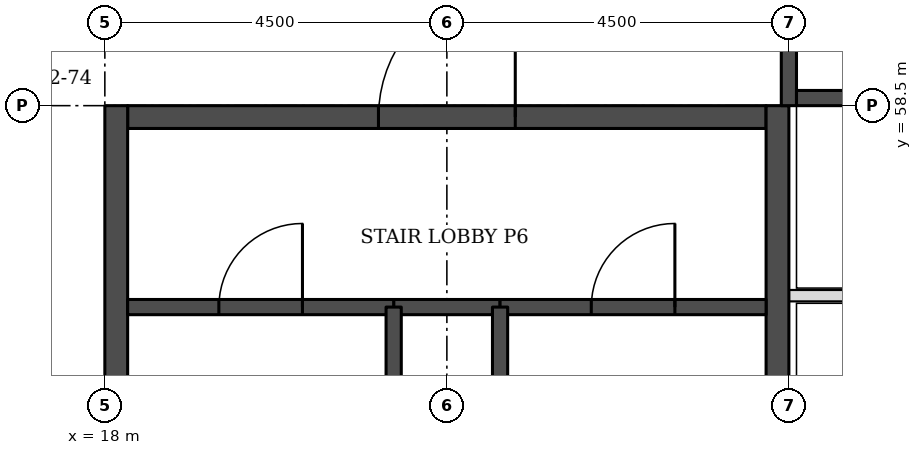
"""IFC4 building model, lengths in metres.
Left out: names, types, materials, properties, quantities, classifications, styles, units other than length and angle.
Written with IfcOpenShell. Run it as: python <this file> out.ifc"""

import sys

from ifc_helpers import new_model, si_unit, direction, frame, frame_2d, origin, place, context, subcontext, project, spatial, rectangle, extrude, element, fill, save


model = new_model("IFC4")
c1 = context("Model", 3, precision=1e-05, world=origin(), true_north=direction((0.0, 1.0)))
c2 = subcontext(c1, "Body", "Model", "MODEL_VIEW")
j1 = project(units=[si_unit("LENGTHUNIT", "METRE"), si_unit("PLANEANGLEUNIT", "RADIAN")], contexts=[c1])
p1 = place(None, origin())
s1 = spatial("IfcSite", under=j1, at=p1, CompositionType="ELEMENT")
p2 = place(p1, origin())
s2 = spatial("IfcBuilding", under=s1, at=p2, CompositionType="ELEMENT")
p3 = place(p2, frame((0.0, 0.0, 29.7)))
s3 = spatial("IfcBuildingStorey", under=s2, at=p3, CompositionType="ELEMENT", Elevation=29.7)
p4 = place(p3, frame((18.3, 58.35, 0.0), z_axis=(0.0, 0.0, 1.0), x_axis=(1.0, 0.0, 0.0)))
e1 = element("IfcWall", 1, at=p4, inside=s3, PredefinedType="SHEAR", context=c2, shape_type="SweptSolid", body=[
    extrude(rectangle(XDim=8.4, YDim=0.3, at=frame_2d((4.2, 0.0))), origin(), (0.0, 0.0, 1.0), 3.3),
])
p5 = place(p4, frame((3.3, 0.0, 0.0)))
e2 = element("IfcOpeningElement", 2, at=p5, cuts=e1, PredefinedType="OPENING", context=c2, shape_type="SweptSolid", body=[
    extrude(rectangle(XDim=1.8, YDim=2.1, at=frame_2d((0.9, 1.05))), frame((0.0, 0.16, 0.0), z_axis=(0.0, -1.0, 0.0), x_axis=(1.0, 0.0, 0.0)), (0.0, 0.0, 1.0), 0.32),
])
for number, where, z_axis, x_axis in (
    (3, (18.15, 49.5, 0.0), (0.0, 0.0, 1.0), (0.0, 1.0, 0.0)),
    (4, (26.85, 49.5, 0.0), (0.0, 0.0, 1.0), (0.0, 1.0, 0.0)),
):
    element("IfcWall", number, at=place(p3, frame(where, z_axis=z_axis, x_axis=x_axis)), inside=s3, PredefinedType="SHEAR", context=c2, shape_type="SweptSolid", body=[
        extrude(rectangle(XDim=9.0, YDim=0.3, at=frame_2d((4.5, 0.0))), origin(), (0.0, 0.0, 1.0), 3.3),
    ])
p6 = place(p3, frame((17.73, 63.826, 0.0), z_axis=(0.0, 0.0, 1.0), x_axis=(-0.707106781187, -0.707106781187, 0.0)))
e5 = element("IfcWall", 5, at=p6, inside=s3, PredefinedType="STANDARD", context=c2, shape_type="SweptSolid", body=[
    extrude(rectangle(XDim=7.151, YDim=0.35, at=frame_2d((3.576, 0.0))), origin(), (0.0, 0.0, 1.0), 3.055),
])
p7 = place(p6, frame((1.926, 0.0, 0.8)))
e6 = element("IfcOpeningElement", 6, at=p7, cuts=e5, PredefinedType="OPENING", context=c2, shape_type="SweptSolid", body=[
    extrude(rectangle(XDim=3.3, YDim=1.5, at=frame_2d((1.65, 0.75))), frame((0.0, 0.185, 0.0), z_axis=(0.0, -1.0, 0.0), x_axis=(1.0, 0.0, 0.0)), (0.0, 0.0, 1.0), 0.37),
])
p8 = place(p3, frame((27.0, 56.0, 0.0), z_axis=(0.0, 0.0, 1.0), x_axis=(1.0, 0.0, 0.0)))
e7 = element("IfcWall", 7, at=p8, inside=s3, PredefinedType="PARTITIONING", context=c2, shape_type="SweptSolid", body=[
    extrude(rectangle(XDim=16.0, YDim=0.15, at=frame_2d((8.0, 0.0))), origin(), (0.0, 0.0, 1.0), 3.08),
])
p9 = place(p8, frame((5.6, 0.0, 0.0)))
e8 = element("IfcOpeningElement", 8, at=p9, cuts=e7, PredefinedType="OPENING", context=c2, shape_type="SweptSolid", body=[
    extrude(rectangle(XDim=1.0, YDim=2.1, at=frame_2d((0.5, 1.05))), frame((0.0, 0.085, 0.0), z_axis=(0.0, -1.0, 0.0), x_axis=(1.0, 0.0, 0.0)), (0.0, 0.0, 1.0), 0.17),
])
p10 = place(p3, frame((27.0, 58.5, 0.0), z_axis=(0.0, 0.0, 1.0), x_axis=(0.0, 1.0, 0.0)))
e9 = element("IfcWall", 9, at=p10, inside=s3, PredefinedType="SOLIDWALL", context=c2, shape_type="SweptSolid", body=[
    extrude(rectangle(XDim=3.9, YDim=0.2, at=frame_2d((1.95, 0.0))), origin(), (0.0, 0.0, 1.0), 3.08),
])
p11 = place(p3, frame((27.1, 58.6, 0.0), z_axis=(0.0, 0.0, 1.0), x_axis=(1.0, 0.0, 0.0)))
e10 = element("IfcWall", 10, at=p11, inside=s3, PredefinedType="SOLIDWALL", context=c2, shape_type="SweptSolid", body=[
    extrude(rectangle(XDim=3.1, YDim=0.2, at=frame_2d((1.55, 0.0))), origin(), (0.0, 0.0, 1.0), 3.08),
])
p12 = place(p3, frame((21.8, 55.85, 0.0), z_axis=(0.0, 0.0, 1.0), x_axis=(1.0, 0.0, 0.0)))
e11 = element("IfcWall", 11, at=p12, inside=s3, PredefinedType="SOLIDWALL", context=c2, shape_type="SweptSolid", body=[
    extrude(rectangle(XDim=1.4, YDim=0.2, at=frame_2d((0.7, 0.0))), origin(), (0.0, 0.0, 1.0), 3.08),
])
p13 = place(p3, frame((18.3, 55.85, 0.0), z_axis=(0.0, 0.0, 1.0), x_axis=(1.0, 0.0, 0.0)))
e12 = element("IfcWall", 12, at=p13, inside=s3, PredefinedType="SOLIDWALL", context=c2, shape_type="SweptSolid", body=[
    extrude(rectangle(XDim=3.5, YDim=0.2, at=frame_2d((1.75, 0.0))), origin(), (0.0, 0.0, 1.0), 3.08),
])
p14 = place(p13, frame((1.2, 0.0, 0.0)))
e13 = element("IfcOpeningElement", 13, at=p14, cuts=e12, PredefinedType="OPENING", context=c2, shape_type="SweptSolid", body=[
    extrude(rectangle(XDim=1.1, YDim=2.1, at=frame_2d((0.55, 1.05))), frame((0.0, 0.11, 0.0), z_axis=(0.0, -1.0, 0.0), x_axis=(1.0, 0.0, 0.0)), (0.0, 0.0, 1.0), 0.22),
])
p15 = place(p3, frame((23.2, 55.85, 0.0), z_axis=(0.0, 0.0, 1.0), x_axis=(1.0, 0.0, 0.0)))
e14 = element("IfcWall", 14, at=p15, inside=s3, PredefinedType="SOLIDWALL", context=c2, shape_type="SweptSolid", body=[
    extrude(rectangle(XDim=3.5, YDim=0.2, at=frame_2d((1.75, 0.0))), origin(), (0.0, 0.0, 1.0), 3.08),
])
p16 = place(p15, frame((1.2, 0.0, 0.0)))
e15 = element("IfcOpeningElement", 15, at=p16, cuts=e14, PredefinedType="OPENING", context=c2, shape_type="SweptSolid", body=[
    extrude(rectangle(XDim=1.1, YDim=2.1, at=frame_2d((0.55, 1.05))), frame((0.0, 0.11, 0.0), z_axis=(0.0, -1.0, 0.0), x_axis=(1.0, 0.0, 0.0)), (0.0, 0.0, 1.0), 0.22),
])
for number, where, z_axis, x_axis in (
    (16, (21.8, 49.8, 0.0), (0.0, 0.0, 1.0), (0.0, 1.0, 0.0)),
    (17, (23.2, 49.8, 0.0), (0.0, 0.0, 1.0), (0.0, 1.0, 0.0)),
):
    element("IfcWall", number, at=place(p3, frame(where, z_axis=z_axis, x_axis=x_axis)), inside=s3, PredefinedType="SOLIDWALL", context=c2, shape_type="SweptSolid", body=[
        extrude(rectangle(XDim=6.05, YDim=0.2, at=frame_2d((3.025, 0.0))), origin(), (0.0, 0.0, 1.0), 3.08),
    ])
p17 = place(p14, origin())
e18 = element("IfcDoor", 18, at=p17, inside=s3, OperationType="SINGLE_SWING_RIGHT", PredefinedType="DOOR", context=c2, shape_type="SweptSolid", body=[
    extrude(rectangle(XDim=1.1, YDim=2.1, at=frame_2d((0.55, 1.05))), frame((0.0, 0.025, 0.0), z_axis=(0.0, -1.0, 0.0), x_axis=(1.0, 0.0, 0.0)), (0.0, 0.0, 1.0), 0.05),
])
fill(e13, e18)
p18 = place(p16, origin())
e19 = element("IfcDoor", 19, at=p18, inside=s3, OperationType="SINGLE_SWING_RIGHT", PredefinedType="DOOR", context=c2, shape_type="SweptSolid", body=[
    extrude(rectangle(XDim=1.1, YDim=2.1, at=frame_2d((0.55, 1.05))), frame((0.0, 0.025, 0.0), z_axis=(0.0, -1.0, 0.0), x_axis=(1.0, 0.0, 0.0)), (0.0, 0.0, 1.0), 0.05),
])
fill(e15, e19)
p19 = place(p5, origin())
e20 = element("IfcDoor", 20, at=p19, inside=s3, OperationType="SINGLE_SWING_RIGHT", PredefinedType="DOOR", context=c2, shape_type="SweptSolid", body=[
    extrude(rectangle(XDim=1.8, YDim=2.1, at=frame_2d((0.9, 1.05))), frame((0.0, 0.025, 0.0), z_axis=(0.0, -1.0, 0.0), x_axis=(1.0, 0.0, 0.0)), (0.0, 0.0, 1.0), 0.05),
])
fill(e2, e20)
save(model, sys.argv[1])
